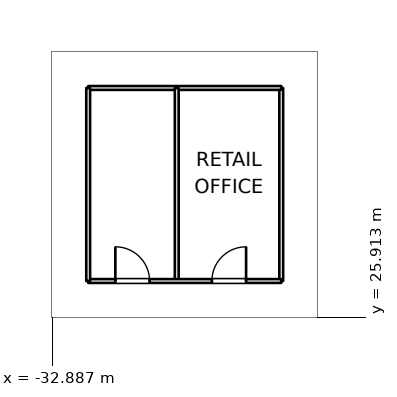
"""IFC4 building model, lengths in metres.
Left out: names, types, materials, properties, quantities, classifications, styles, units other than length and angle.
Written with IfcOpenShell. Run it as: python <this file> out.ifc"""

import sys

from ifc_helpers import new_model, si_unit, direction, frame, frame_2d, origin, place, context, subcontext, project, spatial, rectangle, extrude, element, fill, save


model = new_model("IFC4")
c1 = context("Model", 3, precision=1e-05, world=origin(), true_north=direction((0.0, 1.0)))
c2 = subcontext(c1, "Body", "Model", "MODEL_VIEW")
j1 = project(units=[si_unit("LENGTHUNIT", "METRE"), si_unit("PLANEANGLEUNIT", "RADIAN")], contexts=[c1])
p1 = place(None, origin())
s1 = spatial("IfcSite", under=j1, at=p1, CompositionType="ELEMENT")
p2 = place(p1, origin())
s2 = spatial("IfcBuilding", under=s1, at=p2, CompositionType="ELEMENT")
p3 = place(p2, origin())
s3 = spatial("IfcBuildingStorey", under=s2, at=p3, CompositionType="ELEMENT", Elevation=0.0)
p4 = place(p3, frame((-31.94, 26.86, 0.0), z_axis=(0.0, 0.0, 1.0), x_axis=(1.0, 0.0, 0.0)))
e1 = element("IfcWall", 1, at=p4, inside=s3, PredefinedType="PARTITIONING", context=c2, shape_type="SweptSolid", body=[
    extrude(rectangle(XDim=5.08, YDim=0.1, at=frame_2d((2.54, 0.0))), origin(), (0.0, 0.0, 1.0), 5.7),
])
p5 = place(p4, frame((0.715, 0.0, 0.0)))
e2 = element("IfcOpeningElement", 2, at=p5, cuts=e1, PredefinedType="OPENING", context=c2, shape_type="SweptSolid", body=[
    extrude(rectangle(XDim=0.9, YDim=2.1, at=frame_2d((0.45, 1.05))), frame((0.0, 0.06, 0.0), z_axis=(0.0, -1.0, 0.0), x_axis=(1.0, 0.0, 0.0)), (0.0, 0.0, 1.0), 0.12),
])
p6 = place(p4, frame((3.255, 0.0, 0.0)))
e3 = element("IfcOpeningElement", 3, at=p6, cuts=e1, PredefinedType="OPENING", context=c2, shape_type="SweptSolid", body=[
    extrude(rectangle(XDim=0.9, YDim=2.1, at=frame_2d((0.45, 1.05))), frame((0.0, 0.06, 0.0), z_axis=(0.0, -1.0, 0.0), x_axis=(1.0, 0.0, 0.0)), (0.0, 0.0, 1.0), 0.12),
])
for number, where, z_axis, x_axis in (
    (4, (-26.86, 26.86, 0.0), (0.0, 0.0, 1.0), (0.0, 1.0, 0.0)),
    (5, (-26.86, 31.94, 0.0), (0.0, 0.0, 1.0), (-1.0, 0.0, 0.0)),
    (6, (-31.94, 31.94, 0.0), (0.0, 0.0, 1.0), (0.0, -1.0, 0.0)),
    (7, (-29.61, 26.86, 0.0), (0.0, 0.0, 1.0), (0.0, 1.0, 0.0)),
):
    element("IfcWall", number, at=place(p3, frame(where, z_axis=z_axis, x_axis=x_axis)), inside=s3, PredefinedType="PARTITIONING", context=c2, shape_type="SweptSolid", body=[
        extrude(rectangle(XDim=5.08, YDim=0.1, at=frame_2d((2.54, 0.0))), origin(), (0.0, 0.0, 1.0), 5.7),
    ])
p7 = place(p5, origin())
e8 = element("IfcDoor", 8, at=p7, inside=s3, OperationType="SINGLE_SWING_LEFT", PredefinedType="DOOR", context=c2, shape_type="SweptSolid", body=[
    extrude(rectangle(XDim=0.9, YDim=2.1, at=frame_2d((0.45, 1.05))), frame((0.0, 0.025, 0.0), z_axis=(0.0, -1.0, 0.0), x_axis=(1.0, 0.0, 0.0)), (0.0, 0.0, 1.0), 0.05),
])
fill(e2, e8)
p8 = place(p6, origin())
e9 = element("IfcDoor", 9, at=p8, inside=s3, OperationType="SINGLE_SWING_RIGHT", PredefinedType="DOOR", context=c2, shape_type="SweptSolid", body=[
    extrude(rectangle(XDim=0.9, YDim=2.1, at=frame_2d((0.45, 1.05))), frame((0.0, 0.025, 0.0), z_axis=(0.0, -1.0, 0.0), x_axis=(1.0, 0.0, 0.0)), (0.0, 0.0, 1.0), 0.05),
])
fill(e3, e9)
save(model, sys.argv[1])
